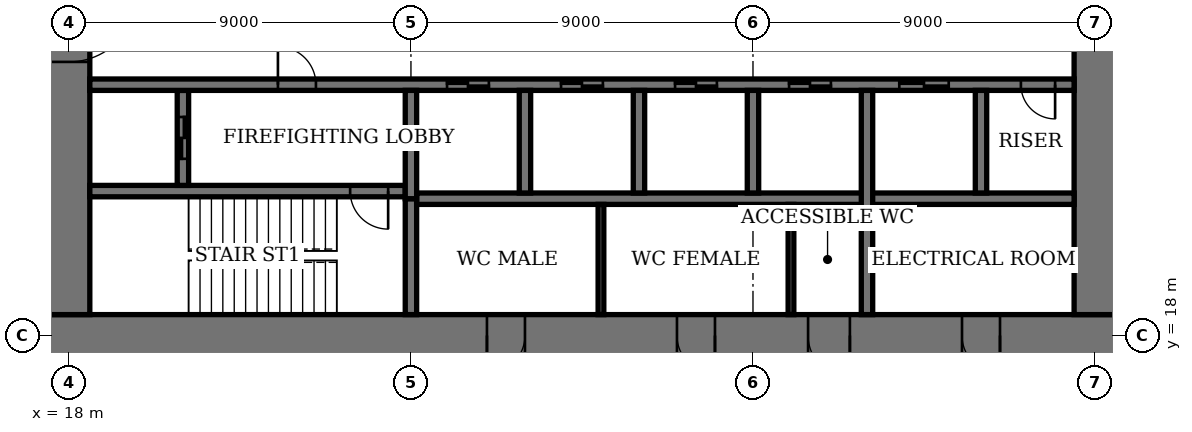
"""IFC4 building model, lengths in metres.
Left out: names, types, materials, properties, quantities, classifications, styles, units other than length and angle.
Written with IfcOpenShell. Run it as: python <this file> out.ifc"""

import sys

from ifc_helpers import new_model, si_unit, direction, frame, frame_2d, origin, place, context, subcontext, project, spatial, rectangle, extrude, element, fill, save


model = new_model("IFC4")
c1 = context("Model", 3, precision=1e-05, world=origin(), true_north=direction((0.0, 1.0)))
c2 = subcontext(c1, "Body", "Model", "MODEL_VIEW")
j1 = project(units=[si_unit("LENGTHUNIT", "METRE"), si_unit("PLANEANGLEUNIT", "RADIAN")], contexts=[c1])
p1 = place(None, origin())
s1 = spatial("IfcSite", under=j1, at=p1, CompositionType="ELEMENT")
p2 = place(p1, origin())
s2 = spatial("IfcBuilding", under=s1, at=p2, CompositionType="ELEMENT")
p3 = place(p2, frame((0.0, 0.0, 255.4)))
s3 = spatial("IfcBuildingStorey", under=s2, at=p3, CompositionType="ELEMENT", Elevation=255.4)
p4 = place(p3, frame((17.45, 18.0, 0.0), z_axis=(0.0, 0.0, 1.0), x_axis=(1.0, 0.0, 0.0)))
e1 = element("IfcWall", 1, at=p4, inside=s3, PredefinedType="SHEAR", context=c2, shape_type="SweptSolid", body=[
    extrude(rectangle(XDim=28.1, YDim=1.1, at=frame_2d((14.05, 0.0))), origin(), (0.0, 0.0, 1.0), 4.0),
])
p5 = place(p4, frame((11.55, 0.0, 0.0)))
e2 = element("IfcOpeningElement", 2, at=p5, cuts=e1, PredefinedType="OPENING", context=c2, shape_type="SweptSolid", body=[
    extrude(rectangle(XDim=1.0, YDim=2.4, at=frame_2d((0.5, 1.2))), frame((0.0, 0.56, 0.0), z_axis=(0.0, -1.0, 0.0), x_axis=(1.0, 0.0, 0.0)), (0.0, 0.0, 1.0), 1.12),
])
p6 = place(p4, frame((16.55, 0.0, 0.0)))
e3 = element("IfcOpeningElement", 3, at=p6, cuts=e1, PredefinedType="OPENING", context=c2, shape_type="SweptSolid", body=[
    extrude(rectangle(XDim=1.0, YDim=2.4, at=frame_2d((0.5, 1.2))), frame((0.0, 0.56, 0.0), z_axis=(0.0, -1.0, 0.0), x_axis=(1.0, 0.0, 0.0)), (0.0, 0.0, 1.0), 1.12),
])
p7 = place(p4, frame((20.0, 0.0, 0.0)))
e4 = element("IfcOpeningElement", 4, at=p7, cuts=e1, PredefinedType="OPENING", context=c2, shape_type="SweptSolid", body=[
    extrude(rectangle(XDim=1.1, YDim=2.4, at=frame_2d((0.55, 1.2))), frame((0.0, 0.56, 0.0), z_axis=(0.0, -1.0, 0.0), x_axis=(1.0, 0.0, 0.0)), (0.0, 0.0, 1.0), 1.12),
])
p8 = place(p4, frame((24.05, 0.0, 0.0)))
e5 = element("IfcOpeningElement", 5, at=p8, cuts=e1, PredefinedType="OPENING", context=c2, shape_type="SweptSolid", body=[
    extrude(rectangle(XDim=1.0, YDim=2.4, at=frame_2d((0.5, 1.2))), frame((0.0, 0.56, 0.0), z_axis=(0.0, -1.0, 0.0), x_axis=(1.0, 0.0, 0.0)), (0.0, 0.0, 1.0), 1.12),
])
p9 = place(p3, frame((18.0, 35.45, 0.0), z_axis=(0.0, 0.0, 1.0), x_axis=(0.0, -1.0, 0.0)))
e6 = element("IfcWall", 6, at=p9, inside=s3, PredefinedType="SHEAR", context=c2, shape_type="SweptSolid", body=[
    extrude(rectangle(XDim=16.9, YDim=1.1, at=frame_2d((8.45, 0.0))), origin(), (0.0, 0.0, 1.0), 4.0),
])
p10 = place(p9, frame((8.45, 0.0, 0.0)))
e7 = element("IfcOpeningElement", 7, at=p10, cuts=e6, PredefinedType="OPENING", context=c2, shape_type="SweptSolid", body=[
    extrude(rectangle(XDim=1.8, YDim=2.4, at=frame_2d((0.9, 1.2))), frame((0.0, 0.56, 0.0), z_axis=(0.0, -1.0, 0.0), x_axis=(1.0, 0.0, 0.0)), (0.0, 0.0, 1.0), 1.12),
])
p11 = place(p3, frame((45.0, 18.55, 0.0), z_axis=(0.0, 0.0, 1.0), x_axis=(0.0, 1.0, 0.0)))
e8 = element("IfcWall", 8, at=p11, inside=s3, PredefinedType="SHEAR", context=c2, shape_type="SweptSolid", body=[
    extrude(rectangle(XDim=16.9, YDim=1.1, at=frame_2d((8.45, 0.0))), origin(), (0.0, 0.0, 1.0), 4.0),
])
p12 = place(p11, frame((8.45, 0.0, 0.0)))
e9 = element("IfcOpeningElement", 9, at=p12, cuts=e8, PredefinedType="OPENING", context=c2, shape_type="SweptSolid", body=[
    extrude(rectangle(XDim=1.8, YDim=2.4, at=frame_2d((0.9, 1.2))), frame((0.0, 0.56, 0.0), z_axis=(0.0, -1.0, 0.0), x_axis=(1.0, 0.0, 0.0)), (0.0, 0.0, 1.0), 1.12),
])
p13 = place(p3, frame((18.55, 21.8, 0.0), z_axis=(0.0, 0.0, 1.0), x_axis=(1.0, 0.0, 0.0)))
e10 = element("IfcWall", 10, at=p13, inside=s3, PredefinedType="SHEAR", context=c2, shape_type="SweptSolid", body=[
    extrude(rectangle(XDim=8.3, YDim=0.3, at=frame_2d((4.15, 0.0))), origin(), (0.0, 0.0, 1.0), 4.0),
])
p14 = place(p13, frame((6.85, 0.0, 0.0)))
e11 = element("IfcOpeningElement", 11, at=p14, cuts=e10, PredefinedType="OPENING", context=c2, shape_type="SweptSolid", body=[
    extrude(rectangle(XDim=1.0, YDim=2.4, at=frame_2d((0.5, 1.2))), frame((0.0, 0.16, 0.0), z_axis=(0.0, -1.0, 0.0), x_axis=(1.0, 0.0, 0.0)), (0.0, 0.0, 1.0), 0.32),
])
p15 = place(p3, frame((27.0, 18.55, 0.0), z_axis=(0.0, 0.0, 1.0), x_axis=(0.0, 1.0, 0.0)))
e12 = element("IfcWall", 12, at=p15, inside=s3, PredefinedType="SHEAR", context=c2, shape_type="SweptSolid", body=[
    extrude(rectangle(XDim=3.05, YDim=0.3, at=frame_2d((1.525, 0.0))), origin(), (0.0, 0.0, 1.0), 4.0),
])
p16 = place(p3, frame((21.0, 21.95, 0.0), z_axis=(0.0, 0.0, 1.0), x_axis=(0.0, 1.0, 0.0)))
e13 = element("IfcWall", 13, at=p16, inside=s3, PredefinedType="SHEAR", context=c2, shape_type="SweptSolid", body=[
    extrude(rectangle(XDim=2.5, YDim=0.3, at=frame_2d((1.25, 0.0))), origin(), (0.0, 0.0, 1.0), 4.0),
])
p17 = place(p16, frame((0.7, 0.0, 0.0)))
e14 = element("IfcOpeningElement", 14, at=p17, cuts=e13, PredefinedType="OPENING", context=c2, shape_type="SweptSolid", body=[
    extrude(rectangle(XDim=1.1, YDim=2.4, at=frame_2d((0.55, 1.2))), frame((0.0, 0.16, 0.0), z_axis=(0.0, -1.0, 0.0), x_axis=(1.0, 0.0, 0.0)), (0.0, 0.0, 1.0), 0.32),
])
p18 = place(p3, frame((18.55, 24.6, 0.0), z_axis=(0.0, 0.0, 1.0), x_axis=(1.0, 0.0, 0.0)))
e15 = element("IfcWall", 15, at=p18, inside=s3, PredefinedType="SHEAR", context=c2, shape_type="SweptSolid", body=[
    extrude(rectangle(XDim=25.9, YDim=0.3, at=frame_2d((12.95, 0.0))), origin(), (0.0, 0.0, 1.0), 4.0),
])
p19 = place(p18, frame((4.95, 0.0, 0.0)))
e16 = element("IfcOpeningElement", 16, at=p19, cuts=e15, PredefinedType="OPENING", context=c2, shape_type="SweptSolid", body=[
    extrude(rectangle(XDim=1.0, YDim=2.4, at=frame_2d((0.5, 1.2))), frame((0.0, 0.16, 0.0), z_axis=(0.0, -1.0, 0.0), x_axis=(1.0, 0.0, 0.0)), (0.0, 0.0, 1.0), 0.32),
])
p20 = place(p18, frame((24.5, 0.0, 0.0)))
e17 = element("IfcOpeningElement", 17, at=p20, cuts=e15, PredefinedType="OPENING", context=c2, shape_type="SweptSolid", body=[
    extrude(rectangle(XDim=0.9, YDim=2.1, at=frame_2d((0.45, 1.05))), frame((0.0, 0.16, 0.0), z_axis=(0.0, -1.0, 0.0), x_axis=(1.0, 0.0, 0.0)), (0.0, 0.0, 1.0), 0.32),
])
p21 = place(p18, frame((9.4, 0.0, 0.0)))
e18 = element("IfcOpeningElement", 18, at=p21, cuts=e15, PredefinedType="OPENING", context=c2, shape_type="SweptSolid", body=[
    extrude(rectangle(XDim=1.1, YDim=2.4, at=frame_2d((0.55, 1.2))), frame((0.0, 0.16, 0.0), z_axis=(0.0, -1.0, 0.0), x_axis=(1.0, 0.0, 0.0)), (0.0, 0.0, 1.0), 0.32),
])
p22 = place(p18, frame((12.4, 0.0, 0.0)))
e19 = element("IfcOpeningElement", 19, at=p22, cuts=e15, PredefinedType="OPENING", context=c2, shape_type="SweptSolid", body=[
    extrude(rectangle(XDim=1.1, YDim=2.4, at=frame_2d((0.55, 1.2))), frame((0.0, 0.16, 0.0), z_axis=(0.0, -1.0, 0.0), x_axis=(1.0, 0.0, 0.0)), (0.0, 0.0, 1.0), 0.32),
])
p23 = place(p18, frame((15.4, 0.0, 0.0)))
e20 = element("IfcOpeningElement", 20, at=p23, cuts=e15, PredefinedType="OPENING", context=c2, shape_type="SweptSolid", body=[
    extrude(rectangle(XDim=1.1, YDim=2.4, at=frame_2d((0.55, 1.2))), frame((0.0, 0.16, 0.0), z_axis=(0.0, -1.0, 0.0), x_axis=(1.0, 0.0, 0.0)), (0.0, 0.0, 1.0), 0.32),
])
p24 = place(p18, frame((18.4, 0.0, 0.0)))
e21 = element("IfcOpeningElement", 21, at=p24, cuts=e15, PredefinedType="OPENING", context=c2, shape_type="SweptSolid", body=[
    extrude(rectangle(XDim=1.1, YDim=2.4, at=frame_2d((0.55, 1.2))), frame((0.0, 0.16, 0.0), z_axis=(0.0, -1.0, 0.0), x_axis=(1.0, 0.0, 0.0)), (0.0, 0.0, 1.0), 0.32),
])
p25 = place(p18, frame((21.3, 0.0, 0.0)))
e22 = element("IfcOpeningElement", 22, at=p25, cuts=e15, PredefinedType="OPENING", context=c2, shape_type="SweptSolid", body=[
    extrude(rectangle(XDim=1.3, YDim=2.4, at=frame_2d((0.65, 1.2))), frame((0.0, 0.16, 0.0), z_axis=(0.0, -1.0, 0.0), x_axis=(1.0, 0.0, 0.0)), (0.0, 0.0, 1.0), 0.32),
])
p26 = place(p3, frame((27.15, 21.6, 0.0), z_axis=(0.0, 0.0, 1.0), x_axis=(1.0, 0.0, 0.0)))
e23 = element("IfcWall", 23, at=p26, inside=s3, PredefinedType="SHEAR", context=c2, shape_type="SweptSolid", body=[
    extrude(rectangle(XDim=17.3, YDim=0.3, at=frame_2d((8.65, 0.0))), origin(), (0.0, 0.0, 1.0), 4.0),
])
for number, where, z_axis, x_axis in (
    (24, (30.0, 21.75, 0.0), (0.0, 0.0, 1.0), (0.0, 1.0, 0.0)),
    (25, (33.0, 21.75, 0.0), (0.0, 0.0, 1.0), (0.0, 1.0, 0.0)),
    (26, (36.0, 21.75, 0.0), (0.0, 0.0, 1.0), (0.0, 1.0, 0.0)),
):
    element("IfcWall", number, at=place(p3, frame(where, z_axis=z_axis, x_axis=x_axis)), inside=s3, PredefinedType="SHEAR", context=c2, shape_type="SweptSolid", body=[
        extrude(rectangle(XDim=2.7, YDim=0.3, at=frame_2d((1.35, 0.0))), origin(), (0.0, 0.0, 1.0), 4.0),
    ])
p27 = place(p3, frame((39.0, 18.55, 0.0), z_axis=(0.0, 0.0, 1.0), x_axis=(0.0, 1.0, 0.0)))
e27 = element("IfcWall", 27, at=p27, inside=s3, PredefinedType="SHEAR", context=c2, shape_type="SweptSolid", body=[
    extrude(rectangle(XDim=5.9, YDim=0.3, at=frame_2d((2.95, 0.0))), origin(), (0.0, 0.0, 1.0), 4.0),
])
p28 = place(p3, frame((42.0, 21.75, 0.0), z_axis=(0.0, 0.0, 1.0), x_axis=(0.0, 1.0, 0.0)))
e28 = element("IfcWall", 28, at=p28, inside=s3, PredefinedType="SHEAR", context=c2, shape_type="SweptSolid", body=[
    extrude(rectangle(XDim=2.7, YDim=0.3, at=frame_2d((1.35, 0.0))), origin(), (0.0, 0.0, 1.0), 4.0),
])
p29 = place(p3, frame((27.0, 21.6, 0.0), z_axis=(0.0, 0.0, 1.0), x_axis=(0.0, 1.0, 0.0)))
e29 = element("IfcWall", 29, at=p29, inside=s3, PredefinedType="SHEAR", context=c2, shape_type="SweptSolid", body=[
    extrude(rectangle(XDim=2.85, YDim=0.3, at=frame_2d((1.425, 0.0))), origin(), (0.0, 0.0, 1.0), 4.0),
])
for number, where, z_axis, x_axis in (
    (30, (32.0, 18.55, 0.0), (0.0, 0.0, 1.0), (0.0, 1.0, 0.0)),
    (31, (37.0, 18.55, 0.0), (0.0, 0.0, 1.0), (0.0, 1.0, 0.0)),
):
    element("IfcWall", number, at=place(p3, frame(where, z_axis=z_axis, x_axis=x_axis)), inside=s3, PredefinedType="PARTITIONING", context=c2, shape_type="SweptSolid", body=[
        extrude(rectangle(XDim=2.9, YDim=0.15, at=frame_2d((1.45, 0.0))), origin(), (0.0, 0.0, 1.0), 3.75),
    ])
p30 = place(p10, origin())
e32 = element("IfcDoor", 32, at=p30, inside=s3, OperationType="DOUBLE_DOOR_DOUBLE_SWING", PredefinedType="DOOR", context=c2, shape_type="SweptSolid", body=[
    extrude(rectangle(XDim=1.8, YDim=2.4, at=frame_2d((0.9, 1.2))), frame((0.0, 0.03, 0.0), z_axis=(0.0, -1.0, 0.0), x_axis=(1.0, 0.0, 0.0)), (0.0, 0.0, 1.0), 0.06),
    extrude(rectangle(XDim=0.04, YDim=2.4, at=frame_2d((0.02, 1.2))), frame((0.0, 0.55, 0.0), z_axis=(0.0, -1.0, 0.0), x_axis=(1.0, 0.0, 0.0)), (0.0, 0.0, 1.0), 1.1),
    extrude(rectangle(XDim=0.04, YDim=2.4, at=frame_2d((1.78, 1.2))), frame((0.0, 0.55, 0.0), z_axis=(0.0, -1.0, 0.0), x_axis=(1.0, 0.0, 0.0)), (0.0, 0.0, 1.0), 1.1),
    extrude(rectangle(XDim=1.8, YDim=0.04, at=frame_2d((0.9, 2.38))), frame((0.0, 0.55, 0.0), z_axis=(0.0, -1.0, 0.0), x_axis=(1.0, 0.0, 0.0)), (0.0, 0.0, 1.0), 1.1),
])
fill(e7, e32)
p31 = place(p5, origin())
e33 = element("IfcDoor", 33, at=p31, inside=s3, OperationType="SINGLE_SWING_LEFT", PredefinedType="DOOR", context=c2, shape_type="SweptSolid", body=[
    extrude(rectangle(XDim=1.0, YDim=2.4, at=frame_2d((0.5, 1.2))), frame((0.0, 0.025, 0.0), z_axis=(0.0, -1.0, 0.0), x_axis=(1.0, 0.0, 0.0)), (0.0, 0.0, 1.0), 0.05),
    extrude(rectangle(XDim=0.04, YDim=2.4, at=frame_2d((0.02, 1.2))), frame((0.0, 0.4, 0.0), z_axis=(0.0, -1.0, 0.0), x_axis=(1.0, 0.0, 0.0)), (0.0, 0.0, 1.0), 0.8),
    extrude(rectangle(XDim=0.04, YDim=2.4, at=frame_2d((0.98, 1.2))), frame((0.0, 0.4, 0.0), z_axis=(0.0, -1.0, 0.0), x_axis=(1.0, 0.0, 0.0)), (0.0, 0.0, 1.0), 0.8),
    extrude(rectangle(XDim=1.0, YDim=0.04, at=frame_2d((0.5, 2.38))), frame((0.0, 0.4, 0.0), z_axis=(0.0, -1.0, 0.0), x_axis=(1.0, 0.0, 0.0)), (0.0, 0.0, 1.0), 0.8),
])
fill(e2, e33)
p32 = place(p6, origin())
e34 = element("IfcDoor", 34, at=p32, inside=s3, OperationType="SINGLE_SWING_RIGHT", PredefinedType="DOOR", context=c2, shape_type="SweptSolid", body=[
    extrude(rectangle(XDim=1.0, YDim=2.4, at=frame_2d((0.5, 1.2))), frame((0.0, 0.025, 0.0), z_axis=(0.0, -1.0, 0.0), x_axis=(1.0, 0.0, 0.0)), (0.0, 0.0, 1.0), 0.05),
    extrude(rectangle(XDim=0.04, YDim=2.4, at=frame_2d((0.02, 1.2))), frame((0.0, 0.4, 0.0), z_axis=(0.0, -1.0, 0.0), x_axis=(1.0, 0.0, 0.0)), (0.0, 0.0, 1.0), 0.8),
    extrude(rectangle(XDim=0.04, YDim=2.4, at=frame_2d((0.98, 1.2))), frame((0.0, 0.4, 0.0), z_axis=(0.0, -1.0, 0.0), x_axis=(1.0, 0.0, 0.0)), (0.0, 0.0, 1.0), 0.8),
    extrude(rectangle(XDim=1.0, YDim=0.04, at=frame_2d((0.5, 2.38))), frame((0.0, 0.4, 0.0), z_axis=(0.0, -1.0, 0.0), x_axis=(1.0, 0.0, 0.0)), (0.0, 0.0, 1.0), 0.8),
])
fill(e3, e34)
p33 = place(p7, origin())
e35 = element("IfcDoor", 35, at=p33, inside=s3, OperationType="SINGLE_SWING_RIGHT", PredefinedType="DOOR", context=c2, shape_type="SweptSolid", body=[
    extrude(rectangle(XDim=1.1, YDim=2.4, at=frame_2d((0.55, 1.2))), frame((0.0, 0.025, 0.0), z_axis=(0.0, -1.0, 0.0), x_axis=(1.0, 0.0, 0.0)), (0.0, 0.0, 1.0), 0.05),
    extrude(rectangle(XDim=0.04, YDim=2.4, at=frame_2d((0.02, 1.2))), frame((0.0, 0.44, 0.0), z_axis=(0.0, -1.0, 0.0), x_axis=(1.0, 0.0, 0.0)), (0.0, 0.0, 1.0), 0.88),
    extrude(rectangle(XDim=0.04, YDim=2.4, at=frame_2d((1.08, 1.2))), frame((0.0, 0.44, 0.0), z_axis=(0.0, -1.0, 0.0), x_axis=(1.0, 0.0, 0.0)), (0.0, 0.0, 1.0), 0.88),
    extrude(rectangle(XDim=1.1, YDim=0.04, at=frame_2d((0.55, 2.38))), frame((0.0, 0.44, 0.0), z_axis=(0.0, -1.0, 0.0), x_axis=(1.0, 0.0, 0.0)), (0.0, 0.0, 1.0), 0.88),
])
fill(e4, e35)
p34 = place(p8, origin())
e36 = element("IfcDoor", 36, at=p34, inside=s3, OperationType="SINGLE_SWING_RIGHT", PredefinedType="DOOR", context=c2, shape_type="SweptSolid", body=[
    extrude(rectangle(XDim=1.0, YDim=2.4, at=frame_2d((0.5, 1.2))), frame((0.0, 0.025, 0.0), z_axis=(0.0, -1.0, 0.0), x_axis=(1.0, 0.0, 0.0)), (0.0, 0.0, 1.0), 0.05),
    extrude(rectangle(XDim=0.04, YDim=2.4, at=frame_2d((0.02, 1.2))), frame((0.0, 0.4, 0.0), z_axis=(0.0, -1.0, 0.0), x_axis=(1.0, 0.0, 0.0)), (0.0, 0.0, 1.0), 0.8),
    extrude(rectangle(XDim=0.04, YDim=2.4, at=frame_2d((0.98, 1.2))), frame((0.0, 0.4, 0.0), z_axis=(0.0, -1.0, 0.0), x_axis=(1.0, 0.0, 0.0)), (0.0, 0.0, 1.0), 0.8),
    extrude(rectangle(XDim=1.0, YDim=0.04, at=frame_2d((0.5, 2.38))), frame((0.0, 0.4, 0.0), z_axis=(0.0, -1.0, 0.0), x_axis=(1.0, 0.0, 0.0)), (0.0, 0.0, 1.0), 0.8),
])
fill(e5, e36)
p35 = place(p14, origin())
e37 = element("IfcDoor", 37, at=p35, inside=s3, OperationType="SINGLE_SWING_RIGHT", PredefinedType="DOOR", context=c2, shape_type="SweptSolid", body=[
    extrude(rectangle(XDim=1.0, YDim=2.4, at=frame_2d((0.5, 1.2))), frame((0.0, 0.03, 0.0), z_axis=(0.0, -1.0, 0.0), x_axis=(1.0, 0.0, 0.0)), (0.0, 0.0, 1.0), 0.06),
])
fill(e11, e37)
p36 = place(p19, origin())
e38 = element("IfcDoor", 38, at=p36, inside=s3, OperationType="SINGLE_SWING_RIGHT", PredefinedType="DOOR", context=c2, shape_type="SweptSolid", body=[
    extrude(rectangle(XDim=1.0, YDim=2.4, at=frame_2d((0.5, 1.2))), frame((0.0, 0.03, 0.0), z_axis=(0.0, -1.0, 0.0), x_axis=(1.0, 0.0, 0.0)), (0.0, 0.0, 1.0), 0.06),
])
fill(e16, e38)
p37 = place(p20, origin())
e39 = element("IfcDoor", 39, at=p37, inside=s3, OperationType="SINGLE_SWING_RIGHT", PredefinedType="DOOR", context=c2, shape_type="SweptSolid", body=[
    extrude(rectangle(XDim=0.9, YDim=2.1, at=frame_2d((0.45, 1.05))), frame((0.0, 0.03, 0.0), z_axis=(0.0, -1.0, 0.0), x_axis=(1.0, 0.0, 0.0)), (0.0, 0.0, 1.0), 0.06),
])
fill(e17, e39)
p38 = place(p21, origin())
e40 = element("IfcDoor", 40, at=p38, inside=s3, OperationType="DOUBLE_DOOR_SLIDING", PredefinedType="DOOR", context=c2, shape_type="SweptSolid", body=[
    extrude(rectangle(XDim=1.1, YDim=2.4, at=frame_2d((0.55, 1.2))), frame((0.0, 0.02, 0.0), z_axis=(0.0, -1.0, 0.0), x_axis=(1.0, 0.0, 0.0)), (0.0, 0.0, 1.0), 0.04),
])
fill(e18, e40)
p39 = place(p22, origin())
e41 = element("IfcDoor", 41, at=p39, inside=s3, OperationType="DOUBLE_DOOR_SLIDING", PredefinedType="DOOR", context=c2, shape_type="SweptSolid", body=[
    extrude(rectangle(XDim=1.1, YDim=2.4, at=frame_2d((0.55, 1.2))), frame((0.0, 0.02, 0.0), z_axis=(0.0, -1.0, 0.0), x_axis=(1.0, 0.0, 0.0)), (0.0, 0.0, 1.0), 0.04),
])
fill(e19, e41)
p40 = place(p23, origin())
e42 = element("IfcDoor", 42, at=p40, inside=s3, OperationType="DOUBLE_DOOR_SLIDING", PredefinedType="DOOR", context=c2, shape_type="SweptSolid", body=[
    extrude(rectangle(XDim=1.1, YDim=2.4, at=frame_2d((0.55, 1.2))), frame((0.0, 0.02, 0.0), z_axis=(0.0, -1.0, 0.0), x_axis=(1.0, 0.0, 0.0)), (0.0, 0.0, 1.0), 0.04),
])
fill(e20, e42)
p41 = place(p24, origin())
e43 = element("IfcDoor", 43, at=p41, inside=s3, OperationType="DOUBLE_DOOR_SLIDING", PredefinedType="DOOR", context=c2, shape_type="SweptSolid", body=[
    extrude(rectangle(XDim=1.1, YDim=2.4, at=frame_2d((0.55, 1.2))), frame((0.0, 0.02, 0.0), z_axis=(0.0, -1.0, 0.0), x_axis=(1.0, 0.0, 0.0)), (0.0, 0.0, 1.0), 0.04),
])
fill(e21, e43)
p42 = place(p25, origin())
e44 = element("IfcDoor", 44, at=p42, inside=s3, OperationType="DOUBLE_DOOR_SLIDING", PredefinedType="DOOR", context=c2, shape_type="SweptSolid", body=[
    extrude(rectangle(XDim=1.3, YDim=2.4, at=frame_2d((0.65, 1.2))), frame((0.0, 0.02, 0.0), z_axis=(0.0, -1.0, 0.0), x_axis=(1.0, 0.0, 0.0)), (0.0, 0.0, 1.0), 0.04),
])
fill(e22, e44)
p43 = place(p17, origin())
e45 = element("IfcDoor", 45, at=p43, inside=s3, OperationType="DOUBLE_DOOR_SLIDING", PredefinedType="DOOR", context=c2, shape_type="SweptSolid", body=[
    extrude(rectangle(XDim=1.1, YDim=2.4, at=frame_2d((0.55, 1.2))), frame((0.0, 0.03, 0.0), z_axis=(0.0, -1.0, 0.0), x_axis=(1.0, 0.0, 0.0)), (0.0, 0.0, 1.0), 0.06),
])
fill(e14, e45)
save(model, sys.argv[1])
